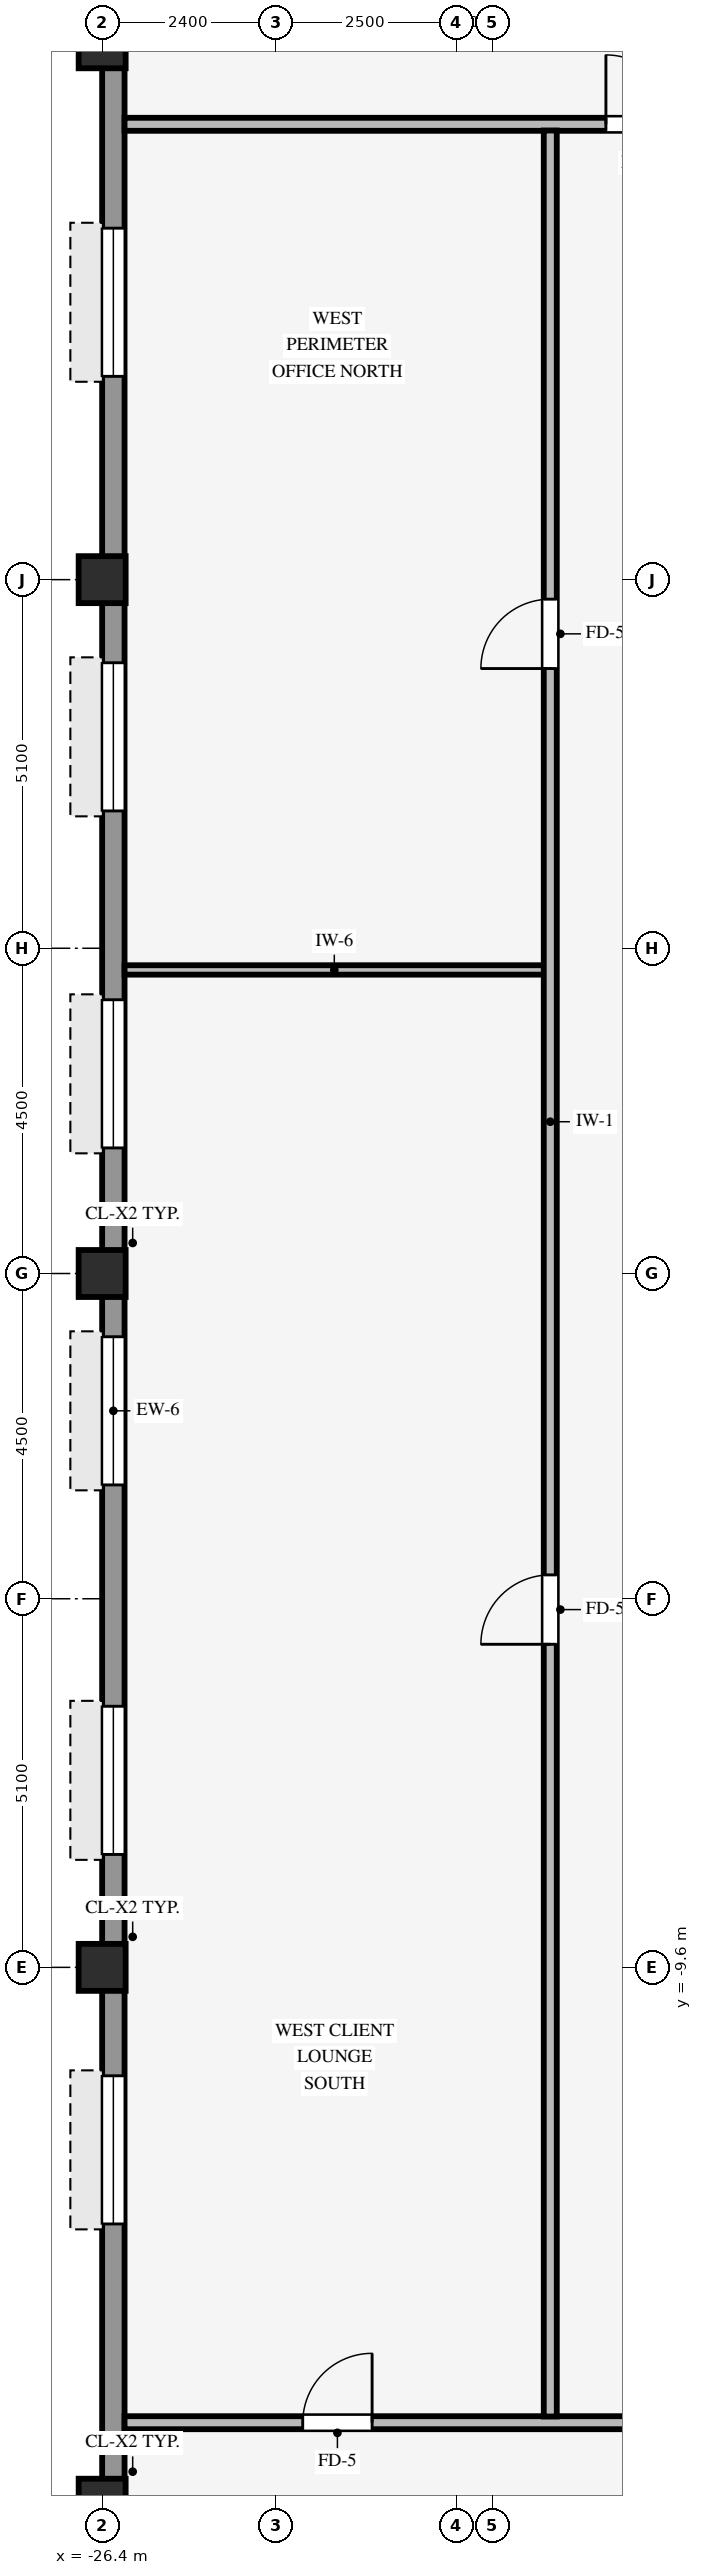
"""IFC4 building model, lengths in metres.
Left out: names, types, materials, properties, quantities, classifications, styles, units other than length and angle.
Written with IfcOpenShell. Run it as: python <this file> out.ifc"""

import sys

from ifc_helpers import new_model, si_unit, direction, frame, frame_2d, origin, origin_2d, place, context, subcontext, project, spatial, rectangle, hollow_rectangle, extrude, source, transform, mapped, element, fill, save


model = new_model("IFC4")
c1 = context("Model", 3, precision=1e-05, world=origin(), true_north=direction((0.0, 1.0)))
c2 = subcontext(c1, "Body", "Model", "MODEL_VIEW")
j1 = project(units=[si_unit("LENGTHUNIT", "METRE"), si_unit("PLANEANGLEUNIT", "RADIAN")], contexts=[c1])
p1 = place(None, origin())
s1 = spatial("IfcSite", under=j1, at=p1, CompositionType="ELEMENT")
p2 = place(p1, origin())
s2 = spatial("IfcBuilding", under=s1, at=p2, CompositionType="ELEMENT")
p3 = place(p2, frame((0.0, 0.0, 178.6)))
s3 = spatial("IfcBuildingStorey", under=s2, at=p3, CompositionType="ELEMENT", Elevation=178.6)
for number, where, z_axis, x_axis in (
    (1, (-26.4, -17.0, 0.0), (0.0, 0.0, 1.0), (1.0, 0.0, 0.0)),
    (2, (-26.4, -9.6, 0.0), (0.0, 0.0, 1.0), (1.0, 0.0, 0.0)),
    (3, (-26.4, 0.0, 0.0), (0.0, 0.0, 1.0), (1.0, 0.0, 0.0)),
    (4, (-26.4, 9.6, 0.0), (0.0, 0.0, 1.0), (1.0, 0.0, 0.0)),
    (5, (-26.4, 17.0, 0.0), (0.0, 0.0, 1.0), (1.0, 0.0, 0.0)),
):
    element("IfcColumn", number, at=place(p3, frame(where, z_axis=z_axis, x_axis=x_axis)), inside=s3, PredefinedType="COLUMN", context=c2, shape_type="SweptSolid", body=[
        extrude(hollow_rectangle(XDim=0.65, YDim=0.65, WallThickness=0.04, InnerFilletRadius=0.04, OuterFilletRadius=0.08, at=origin_2d()), origin(), (0.0, 0.0, 1.0), 3.37),
    ])
p4 = place(p3, frame((-26.245, -20.794, 0.0), z_axis=(0.0, 0.0, 1.0), x_axis=(0.0, 1.0, 0.0)))
e6 = element("IfcWall", 6, at=p4, inside=s3, PredefinedType="STANDARD", context=c2, shape_type="SweptSolid", body=[
    extrude(rectangle(XDim=37.788, YDim=0.31, at=frame_2d((18.894, 0.0))), origin(), (0.0, 0.0, 1.0), 2.705),
])
p5 = place(p4, frame((7.644, 0.0, 0.8)))
e7 = element("IfcOpeningElement", 7, at=p5, cuts=e6, PredefinedType="OPENING", context=c2, shape_type="SweptSolid", body=[
    extrude(rectangle(XDim=2.05, YDim=1.52, at=frame_2d((1.025, 0.76))), frame((0.0, 0.165, 0.0), z_axis=(0.0, -1.0, 0.0), x_axis=(1.0, 0.0, 0.0)), (0.0, 0.0, 1.0), 0.33),
])
p6 = place(p4, frame((12.756, 0.0, 0.8)))
e8 = element("IfcOpeningElement", 8, at=p6, cuts=e6, PredefinedType="OPENING", context=c2, shape_type="SweptSolid", body=[
    extrude(rectangle(XDim=2.05, YDim=1.52, at=frame_2d((1.025, 0.76))), frame((0.0, 0.165, 0.0), z_axis=(0.0, -1.0, 0.0), x_axis=(1.0, 0.0, 0.0)), (0.0, 0.0, 1.0), 0.33),
])
p7 = place(p4, frame((17.869, 0.0, 0.8)))
e9 = element("IfcOpeningElement", 9, at=p7, cuts=e6, PredefinedType="OPENING", context=c2, shape_type="SweptSolid", body=[
    extrude(rectangle(XDim=2.05, YDim=1.52, at=frame_2d((1.025, 0.76))), frame((0.0, 0.165, 0.0), z_axis=(0.0, -1.0, 0.0), x_axis=(1.0, 0.0, 0.0)), (0.0, 0.0, 1.0), 0.33),
])
p8 = place(p4, frame((22.531, 0.0, 0.8)))
e10 = element("IfcOpeningElement", 10, at=p8, cuts=e6, PredefinedType="OPENING", context=c2, shape_type="SweptSolid", body=[
    extrude(rectangle(XDim=2.05, YDim=1.52, at=frame_2d((1.025, 0.76))), frame((0.0, 0.165, 0.0), z_axis=(0.0, -1.0, 0.0), x_axis=(1.0, 0.0, 0.0)), (0.0, 0.0, 1.0), 0.33),
])
p9 = place(p4, frame((27.194, 0.0, 0.8)))
e11 = element("IfcOpeningElement", 11, at=p9, cuts=e6, PredefinedType="OPENING", context=c2, shape_type="SweptSolid", body=[
    extrude(rectangle(XDim=2.05, YDim=1.52, at=frame_2d((1.025, 0.76))), frame((0.0, 0.165, 0.0), z_axis=(0.0, -1.0, 0.0), x_axis=(1.0, 0.0, 0.0)), (0.0, 0.0, 1.0), 0.33),
])
p10 = place(p4, frame((33.207, 0.0, 0.8)))
e12 = element("IfcOpeningElement", 12, at=p10, cuts=e6, PredefinedType="OPENING", context=c2, shape_type="SweptSolid", body=[
    extrude(rectangle(XDim=2.05, YDim=1.52, at=frame_2d((1.025, 0.76))), frame((0.0, 0.165, 0.0), z_axis=(0.0, -1.0, 0.0), x_axis=(1.0, 0.0, 0.0)), (0.0, 0.0, 1.0), 0.33),
])
p11 = place(p3, frame((-26.09, -15.9, 0.0), z_axis=(0.0, 0.0, 1.0), x_axis=(1.0, 0.0, 0.0)))
e13 = element("IfcWall", 13, at=p11, inside=s3, PredefinedType="PARTITIONING", context=c2, shape_type="SweptSolid", body=[
    extrude(rectangle(XDim=48.38, YDim=0.18, at=frame_2d((24.19, 0.0))), origin(), (0.0, 0.0, 1.0), 3.36),
])
p12 = place(p11, frame((40.51, 0.0, 0.0)))
e14 = element("IfcOpeningElement", 14, at=p12, cuts=e13, PredefinedType="OPENING", context=c2, shape_type="SweptSolid", body=[
    extrude(rectangle(XDim=0.96, YDim=2.1, at=frame_2d((0.48, 1.05))), frame((0.0, 0.1, 0.0), z_axis=(0.0, -1.0, 0.0), x_axis=(1.0, 0.0, 0.0)), (0.0, 0.0, 1.0), 0.2),
])
p13 = place(p11, frame((19.995, 0.0, 0.0)))
e15 = element("IfcOpeningElement", 15, at=p13, cuts=e13, PredefinedType="OPENING", context=c2, shape_type="SweptSolid", body=[
    extrude(rectangle(XDim=0.96, YDim=2.1, at=frame_2d((0.48, 1.05))), frame((0.0, 0.1, 0.0), z_axis=(0.0, -1.0, 0.0), x_axis=(1.0, 0.0, 0.0)), (0.0, 0.0, 1.0), 0.2),
])
p14 = place(p11, frame((28.45, 0.0, 0.0)))
e16 = element("IfcOpeningElement", 16, at=p14, cuts=e13, PredefinedType="OPENING", context=c2, shape_type="SweptSolid", body=[
    extrude(rectangle(XDim=0.96, YDim=2.1, at=frame_2d((0.48, 1.05))), frame((0.0, 0.1, 0.0), z_axis=(0.0, -1.0, 0.0), x_axis=(1.0, 0.0, 0.0)), (0.0, 0.0, 1.0), 0.2),
])
p15 = place(p11, frame((11.605, 0.0, 0.0)))
e17 = element("IfcOpeningElement", 17, at=p15, cuts=e13, PredefinedType="OPENING", context=c2, shape_type="SweptSolid", body=[
    extrude(rectangle(XDim=0.96, YDim=2.1, at=frame_2d((0.48, 1.05))), frame((0.0, 0.1, 0.0), z_axis=(0.0, -1.0, 0.0), x_axis=(1.0, 0.0, 0.0)), (0.0, 0.0, 1.0), 0.2),
])
p16 = place(p11, frame((2.465, 0.0, 0.0)))
e18 = element("IfcOpeningElement", 18, at=p16, cuts=e13, PredefinedType="OPENING", context=c2, shape_type="SweptSolid", body=[
    extrude(rectangle(XDim=0.96, YDim=2.1, at=frame_2d((0.48, 1.05))), frame((0.0, 0.1, 0.0), z_axis=(0.0, -1.0, 0.0), x_axis=(1.0, 0.0, 0.0)), (0.0, 0.0, 1.0), 0.2),
])
p17 = place(p3, frame((-26.09, 4.2, 0.0), z_axis=(0.0, 0.0, 1.0), x_axis=(1.0, 0.0, 0.0)))
e19 = element("IfcWall", 19, at=p17, inside=s3, PredefinedType="PARTITIONING", context=c2, shape_type="SweptSolid", body=[
    extrude(rectangle(XDim=5.804, YDim=0.13, at=frame_2d((2.902, 0.0))), origin(), (0.0, 0.0, 1.0), 3.36),
])
p18 = place(p3, frame((-26.09, 15.9, 0.0), z_axis=(0.0, 0.0, 1.0), x_axis=(1.0, 0.0, 0.0)))
e20 = element("IfcWall", 20, at=p18, inside=s3, PredefinedType="PARTITIONING", context=c2, shape_type="SweptSolid", body=[
    extrude(rectangle(XDim=48.38, YDim=0.18, at=frame_2d((24.19, 0.0))), origin(), (0.0, 0.0, 1.0), 3.36),
])
p19 = place(p18, frame((41.36, 0.0, 0.0)))
e21 = element("IfcOpeningElement", 21, at=p19, cuts=e20, PredefinedType="OPENING", context=c2, shape_type="SweptSolid", body=[
    extrude(rectangle(XDim=0.96, YDim=2.1, at=frame_2d((0.48, 1.05))), frame((0.0, 0.1, 0.0), z_axis=(0.0, -1.0, 0.0), x_axis=(1.0, 0.0, 0.0)), (0.0, 0.0, 1.0), 0.2),
])
p20 = place(p18, frame((23.35, 0.0, 0.0)))
e22 = element("IfcOpeningElement", 22, at=p20, cuts=e20, PredefinedType="OPENING", context=c2, shape_type="SweptSolid", body=[
    extrude(rectangle(XDim=0.96, YDim=2.1, at=frame_2d((0.48, 1.05))), frame((0.0, 0.1, 0.0), z_axis=(0.0, -1.0, 0.0), x_axis=(1.0, 0.0, 0.0)), (0.0, 0.0, 1.0), 0.2),
])
p21 = place(p18, frame((14.41, 0.0, 0.0)))
e23 = element("IfcOpeningElement", 23, at=p21, cuts=e20, PredefinedType="OPENING", context=c2, shape_type="SweptSolid", body=[
    extrude(rectangle(XDim=0.96, YDim=2.1, at=frame_2d((0.48, 1.05))), frame((0.0, 0.1, 0.0), z_axis=(0.0, -1.0, 0.0), x_axis=(1.0, 0.0, 0.0)), (0.0, 0.0, 1.0), 0.2),
])
p22 = place(p18, frame((30.015, 0.0, 0.0)))
e24 = element("IfcOpeningElement", 24, at=p22, cuts=e20, PredefinedType="OPENING", context=c2, shape_type="SweptSolid", body=[
    extrude(rectangle(XDim=0.96, YDim=2.1, at=frame_2d((0.48, 1.05))), frame((0.0, 0.1, 0.0), z_axis=(0.0, -1.0, 0.0), x_axis=(1.0, 0.0, 0.0)), (0.0, 0.0, 1.0), 0.2),
])
p23 = place(p18, frame((6.66, 0.0, 0.0)))
e25 = element("IfcOpeningElement", 25, at=p23, cuts=e20, PredefinedType="OPENING", context=c2, shape_type="SweptSolid", body=[
    extrude(rectangle(XDim=0.96, YDim=2.1, at=frame_2d((0.48, 1.05))), frame((0.0, 0.1, 0.0), z_axis=(0.0, -1.0, 0.0), x_axis=(1.0, 0.0, 0.0)), (0.0, 0.0, 1.0), 0.2),
])
p24 = place(p3, frame((-20.2, -15.814, 0.0), z_axis=(0.0, 0.0, 1.0), x_axis=(0.0, 1.0, 0.0)))
e26 = element("IfcWall", 26, at=p24, inside=s3, PredefinedType="PARTITIONING", context=c2, shape_type="SweptSolid", body=[
    extrude(rectangle(XDim=31.628, YDim=0.18, at=frame_2d((15.814, 0.0))), origin(), (0.0, 0.0, 1.0), 3.36),
])
p25 = place(p24, frame((10.684, 0.0, 0.0)))
e27 = element("IfcOpeningElement", 27, at=p25, cuts=e26, PredefinedType="OPENING", context=c2, shape_type="SweptSolid", body=[
    extrude(rectangle(XDim=0.96, YDim=2.1, at=frame_2d((0.48, 1.05))), frame((0.0, 0.1, 0.0), z_axis=(0.0, -1.0, 0.0), x_axis=(1.0, 0.0, 0.0)), (0.0, 0.0, 1.0), 0.2),
])
p26 = place(p24, frame((24.184, 0.0, 0.0)))
e28 = element("IfcOpeningElement", 28, at=p26, cuts=e26, PredefinedType="OPENING", context=c2, shape_type="SweptSolid", body=[
    extrude(rectangle(XDim=0.96, YDim=2.1, at=frame_2d((0.48, 1.05))), frame((0.0, 0.1, 0.0), z_axis=(0.0, -1.0, 0.0), x_axis=(1.0, 0.0, 0.0)), (0.0, 0.0, 1.0), 0.2),
])
m1 = source(origin(), c2, "Body", "SweptSolid", [
    extrude(rectangle(XDim=2.05, YDim=1.52, at=frame_2d((1.025, 0.76))), frame((0.0, 0.03, 0.0), z_axis=(0.0, -1.0, 0.0), x_axis=(1.0, 0.0, 0.0)), (0.0, 0.0, 1.0), 0.06),
])
p27 = place(p5, origin())
e29 = element("IfcWindow", 29, at=p27, inside=s3, PartitioningType="SINGLE_PANEL", PredefinedType="WINDOW", context=c2, shape_type="MappedRepresentation", body=[
    mapped(m1, transform((0.0, 0.0, 0.0), scale=1.0)),
])
fill(e7, e29)
p28 = place(p6, origin())
e30 = element("IfcWindow", 30, at=p28, inside=s3, PartitioningType="SINGLE_PANEL", PredefinedType="WINDOW", context=c2, shape_type="MappedRepresentation", body=[
    mapped(m1, transform((0.0, 0.0, 0.0), scale=1.0)),
])
fill(e8, e30)
p29 = place(p7, origin())
e31 = element("IfcWindow", 31, at=p29, inside=s3, PartitioningType="SINGLE_PANEL", PredefinedType="WINDOW", context=c2, shape_type="MappedRepresentation", body=[
    mapped(m1, transform((0.0, 0.0, 0.0), scale=1.0)),
])
fill(e9, e31)
p30 = place(p8, origin())
e32 = element("IfcWindow", 32, at=p30, inside=s3, PartitioningType="SINGLE_PANEL", PredefinedType="WINDOW", context=c2, shape_type="MappedRepresentation", body=[
    mapped(m1, transform((0.0, 0.0, 0.0), scale=1.0)),
])
fill(e10, e32)
p31 = place(p9, origin())
e33 = element("IfcWindow", 33, at=p31, inside=s3, PartitioningType="SINGLE_PANEL", PredefinedType="WINDOW", context=c2, shape_type="MappedRepresentation", body=[
    mapped(m1, transform((0.0, 0.0, 0.0), scale=1.0)),
])
fill(e11, e33)
p32 = place(p10, origin())
e34 = element("IfcWindow", 34, at=p32, inside=s3, PartitioningType="SINGLE_PANEL", PredefinedType="WINDOW", context=c2, shape_type="MappedRepresentation", body=[
    mapped(m1, transform((0.0, 0.0, 0.0), scale=1.0)),
])
fill(e12, e34)
m2 = source(origin(), c2, "Body", "SweptSolid", [
    extrude(rectangle(XDim=0.96, YDim=2.1, at=frame_2d((0.48, 1.05))), frame((0.0, 0.025, 0.0), z_axis=(0.0, -1.0, 0.0), x_axis=(1.0, 0.0, 0.0)), (0.0, 0.0, 1.0), 0.05),
])
p33 = place(p25, origin())
e35 = element("IfcDoor", 35, at=p33, inside=s3, OperationType="SINGLE_SWING_LEFT", PredefinedType="DOOR", context=c2, shape_type="MappedRepresentation", body=[
    mapped(m2, transform((0.0, 0.0, 0.0), scale=1.0)),
])
fill(e27, e35)
p34 = place(p26, origin())
e36 = element("IfcDoor", 36, at=p34, inside=s3, OperationType="SINGLE_SWING_LEFT", PredefinedType="DOOR", context=c2, shape_type="MappedRepresentation", body=[
    mapped(m2, transform((0.0, 0.0, 0.0), scale=1.0)),
])
fill(e28, e36)
p35 = place(p23, origin())
e37 = element("IfcDoor", 37, at=p35, inside=s3, OperationType="SINGLE_SWING_LEFT", PredefinedType="DOOR", context=c2, shape_type="MappedRepresentation", body=[
    mapped(m2, transform((0.0, 0.0, 0.0), scale=1.0)),
])
fill(e25, e37)
p36 = place(p16, origin())
e38 = element("IfcDoor", 38, at=p36, inside=s3, OperationType="SINGLE_SWING_RIGHT", PredefinedType="DOOR", context=c2, shape_type="MappedRepresentation", body=[
    mapped(m2, transform((0.0, 0.0, 0.0), scale=1.0)),
])
fill(e18, e38)
save(model, sys.argv[1])
